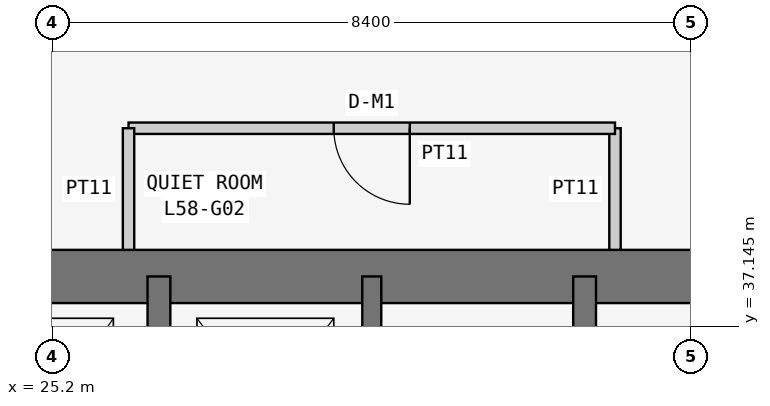
"""IFC4 building model, lengths in metres.
Left out: names, types, materials, properties, quantities, classifications, styles, units other than length and angle.
Written with IfcOpenShell. Run it as: python <this file> out.ifc"""

import sys

from ifc_helpers import new_model, si_unit, direction, frame, frame_2d, origin, place, context, subcontext, project, spatial, rectangle, extrude, element, fill, save


model = new_model("IFC4")
c1 = context("Model", 3, precision=1e-05, world=origin(), true_north=direction((0.0, 1.0)))
c2 = subcontext(c1, "Body", "Model", "MODEL_VIEW")
j1 = project(units=[si_unit("LENGTHUNIT", "METRE"), si_unit("PLANEANGLEUNIT", "RADIAN")], contexts=[c1])
p1 = place(None, origin())
s1 = spatial("IfcSite", under=j1, at=p1, CompositionType="ELEMENT")
p2 = place(p1, origin())
s2 = spatial("IfcBuilding", under=s1, at=p2, CompositionType="ELEMENT")
p3 = place(p2, frame((0.0, 0.0, 222.9)))
s3 = spatial("IfcBuildingStorey", under=s2, at=p3, CompositionType="ELEMENT", Elevation=222.9)
p4 = place(p3, frame((37.8, 37.8, 0.0), z_axis=(0.0, 0.0, 1.0), x_axis=(-1.0, 0.0, 0.0)))
e1 = element("IfcWall", 1, at=p4, inside=s3, PredefinedType="SHEAR", context=c2, shape_type="SweptSolid", body=[
    extrude(rectangle(XDim=17.15, YDim=0.7, at=frame_2d((8.575, 0.0))), origin(), (0.0, 0.0, 1.0), 3.6),
])
p5 = place(p3, frame((26.6, 21.0, 0.0), z_axis=(0.0, 0.0, 1.0), x_axis=(0.0, 1.0, 0.0)))
e2 = element("IfcWall", 2, at=p5, inside=s3, PredefinedType="SHEAR", context=c2, shape_type="SweptSolid", body=[
    extrude(rectangle(XDim=16.8, YDim=0.3, at=frame_2d((8.4, 0.0))), origin(), (0.0, 0.0, 1.0), 3.6),
])
p6 = place(p5, frame((10.4, 0.0, 0.0)))
e3 = element("IfcOpeningElement", 3, at=p6, cuts=e2, PredefinedType="OPENING", context=c2, shape_type="SweptSolid", body=[
    extrude(rectangle(XDim=1.2, YDim=2.1, at=frame_2d((0.6, 1.05))), frame((0.0, 0.16, 0.0), z_axis=(0.0, -1.0, 0.0), x_axis=(1.0, 0.0, 0.0)), (0.0, 0.0, 1.0), 0.32),
])
p7 = place(p3, frame((32.2, 29.25, 0.0), z_axis=(0.0, 0.0, 1.0), x_axis=(0.0, 1.0, 0.0)))
e4 = element("IfcWall", 4, at=p7, inside=s3, PredefinedType="SHEAR", context=c2, shape_type="SweptSolid", body=[
    extrude(rectangle(XDim=8.55, YDim=0.3, at=frame_2d((4.275, 0.0))), origin(), (0.0, 0.0, 1.0), 3.6),
])
p8 = place(p3, frame((29.4, 34.6, 0.0), z_axis=(0.0, 0.0, 1.0), x_axis=(0.0, 1.0, 0.0)))
e5 = element("IfcWall", 5, at=p8, inside=s3, PredefinedType="SHEAR", context=c2, shape_type="SweptSolid", body=[
    extrude(rectangle(XDim=3.2, YDim=0.25, at=frame_2d((1.6, 0.0))), origin(), (0.0, 0.0, 1.0), 3.6),
])
p9 = place(p3, frame((32.6, 38.15, 0.0), z_axis=(0.0, 0.0, 1.0), x_axis=(0.0, 1.0, 0.0)))
e6 = element("IfcWall", 6, at=p9, inside=s3, PredefinedType="PARTITIONING", context=c2, shape_type="SweptSolid", body=[
    extrude(rectangle(XDim=1.6, YDim=0.15, at=frame_2d((0.8, 0.0))), origin(), (0.0, 0.0, 1.0), 3.45),
])
p10 = place(p3, frame((32.6, 39.75, 0.0), z_axis=(0.0, 0.0, 1.0), x_axis=(-1.0, 0.0, 0.0)))
e7 = element("IfcWall", 7, at=p10, inside=s3, PredefinedType="PARTITIONING", context=c2, shape_type="SweptSolid", body=[
    extrude(rectangle(XDim=6.4, YDim=0.15, at=frame_2d((3.2, 0.0))), origin(), (0.0, 0.0, 1.0), 3.45),
])
p11 = place(p10, frame((2.7, 0.0, 0.0)))
e8 = element("IfcOpeningElement", 8, at=p11, cuts=e7, PredefinedType="OPENING", context=c2, shape_type="SweptSolid", body=[
    extrude(rectangle(XDim=1.0, YDim=2.1, at=frame_2d((0.5, 1.05))), frame((0.0, 0.085, 0.0), z_axis=(0.0, -1.0, 0.0), x_axis=(1.0, 0.0, 0.0)), (0.0, 0.0, 1.0), 0.17),
])
p12 = place(p3, frame((26.2, 39.75, 0.0), z_axis=(0.0, 0.0, 1.0), x_axis=(0.0, -1.0, 0.0)))
e9 = element("IfcWall", 9, at=p12, inside=s3, PredefinedType="PARTITIONING", context=c2, shape_type="SweptSolid", body=[
    extrude(rectangle(XDim=1.6, YDim=0.15, at=frame_2d((0.8, 0.0))), origin(), (0.0, 0.0, 1.0), 3.45),
])
p13 = place(p11, origin())
e10 = element("IfcDoor", 10, at=p13, inside=s3, OperationType="SINGLE_SWING_LEFT", PredefinedType="DOOR", context=c2, shape_type="SweptSolid", body=[
    extrude(rectangle(XDim=1.0, YDim=2.1, at=frame_2d((0.5, 1.05))), frame((0.0, 0.025, 0.0), z_axis=(0.0, -1.0, 0.0), x_axis=(1.0, 0.0, 0.0)), (0.0, 0.0, 1.0), 0.05),
])
fill(e8, e10)
save(model, sys.argv[1])
